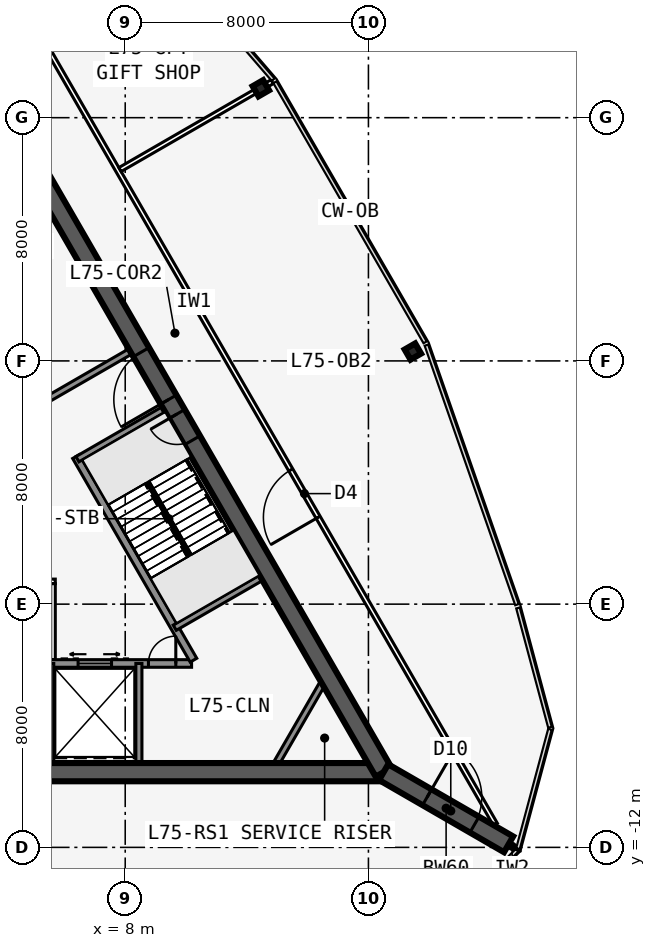
"""IFC4 building model, lengths in metres.
Left out: names, types, materials, properties, quantities, classifications, styles, units other than length and angle.
Written with IfcOpenShell. Run it as: python <this file> out.ifc"""

import sys

from ifc_helpers import new_model, si_unit, direction, frame, frame_2d, origin, origin_2d, place, context, subcontext, project, spatial, rectangle, i_section, extrude, element, fill, save


model = new_model("IFC4")
c1 = context("Model", 3, precision=1e-05, world=origin(), true_north=direction((0.0, 1.0)))
c2 = subcontext(c1, "Body", "Model", "MODEL_VIEW")
j1 = project(units=[si_unit("LENGTHUNIT", "METRE"), si_unit("PLANEANGLEUNIT", "RADIAN")], contexts=[c1])
p1 = place(None, origin())
s1 = spatial("IfcSite", under=j1, at=p1, CompositionType="ELEMENT")
p2 = place(p1, origin())
s2 = spatial("IfcBuilding", under=s1, at=p2, CompositionType="ELEMENT")
p3 = place(p2, frame((0.0, 0.0, 286.8)))
s3 = spatial("IfcBuildingStorey", under=s2, at=p3, CompositionType="ELEMENT", Elevation=286.8)
p4 = place(p3, frame((-16.5, -9.526, 0.0), z_axis=(0.0, 0.0, 1.0), x_axis=(1.0, 0.0, 0.0)))
e1 = element("IfcWall", 1, at=p4, inside=s3, PredefinedType="SHEAR", context=c2, shape_type="SweptSolid", body=[
    extrude(rectangle(XDim=33.0, YDim=0.6, at=frame_2d((16.5, 0.0))), origin(), (0.0, 0.0, 1.0), 6.0),
])
p5 = place(p4, frame((14.05, 0.0, 0.0)))
e2 = element("IfcOpeningElement", 2, at=p5, cuts=e1, PredefinedType="OPENING", context=c2, shape_type="SweptSolid", body=[
    extrude(rectangle(XDim=1.8, YDim=2.13, at=frame_2d((0.9, 1.065))), frame((0.0, 0.31, 0.0), z_axis=(0.0, -1.0, 0.0), x_axis=(1.0, 0.0, 0.0)), (0.0, 0.0, 1.0), 0.62),
])
p6 = place(p3, frame((-0.55, -5.951, 0.0), z_axis=(0.0, 0.0, 1.0), x_axis=(1.0, 0.0, 0.0)))
e3 = element("IfcWall", 3, at=p6, inside=s3, PredefinedType="SOLIDWALL", context=c2, shape_type="SweptSolid", body=[
    extrude(rectangle(XDim=10.733, YDim=0.25, at=frame_2d((5.366, 0.0))), origin(), (0.0, 0.0, 1.0), 5.75),
])
p7 = place(p6, frame((9.314, 0.0, 0.0)))
e4 = element("IfcOpeningElement", 4, at=p7, cuts=e3, PredefinedType="OPENING", context=c2, shape_type="SweptSolid", body=[
    extrude(rectangle(XDim=0.9, YDim=2.13, at=frame_2d((0.45, 1.065))), frame((0.0, 0.135, 0.0), z_axis=(0.0, -1.0, 0.0), x_axis=(1.0, 0.0, 0.0)), (0.0, 0.0, 1.0), 0.27),
])
p8 = place(p6, frame((1.05, 0.0, 0.0)))
e5 = element("IfcOpeningElement", 5, at=p8, cuts=e3, PredefinedType="OPENING", context=c2, shape_type="SweptSolid", body=[
    extrude(rectangle(XDim=1.1, YDim=2.13, at=frame_2d((0.55, 1.065))), frame((0.0, 0.135, 0.0), z_axis=(0.0, -1.0, 0.0), x_axis=(1.0, 0.0, 0.0)), (0.0, 0.0, 1.0), 0.27),
])
p9 = place(p6, frame((4.05, 0.0, 0.0)))
e6 = element("IfcOpeningElement", 6, at=p9, cuts=e3, PredefinedType="OPENING", context=c2, shape_type="SweptSolid", body=[
    extrude(rectangle(XDim=1.1, YDim=2.13, at=frame_2d((0.55, 1.065))), frame((0.0, 0.135, 0.0), z_axis=(0.0, -1.0, 0.0), x_axis=(1.0, 0.0, 0.0)), (0.0, 0.0, 1.0), 0.27),
])
p10 = place(p6, frame((7.0, 0.0, 0.0)))
e7 = element("IfcOpeningElement", 7, at=p10, cuts=e3, PredefinedType="OPENING", context=c2, shape_type="SweptSolid", body=[
    extrude(rectangle(XDim=1.1, YDim=2.13, at=frame_2d((0.55, 1.065))), frame((0.0, 0.135, 0.0), z_axis=(0.0, -1.0, 0.0), x_axis=(1.0, 0.0, 0.0)), (0.0, 0.0, 1.0), 0.27),
])
for number, where, z_axis, x_axis in (
    (8, (5.55, -5.951, 0.0), (0.0, 0.0, 1.0), (0.0, -1.0, 0.0)),
    (9, (8.45, -5.951, 0.0), (0.0, 0.0, 1.0), (0.0, -1.0, 0.0)),
):
    element("IfcWall", number, at=place(p3, frame(where, z_axis=z_axis, x_axis=x_axis)), inside=s3, PredefinedType="SOLIDWALL", context=c2, shape_type="SweptSolid", body=[
        extrude(rectangle(XDim=3.275, YDim=0.2, at=frame_2d((1.637, 0.0))), origin(), (0.0, 0.0, 1.0), 5.75),
    ])
p11 = place(p3, frame((16.5, -9.526, 0.0), z_axis=(0.0, 0.0, 1.0), x_axis=(-0.499999749417, 0.866025548458, 0.0)))
e10 = element("IfcWall", 10, at=p11, inside=s3, PredefinedType="SHEAR", context=c2, shape_type="SweptSolid", body=[
    extrude(rectangle(XDim=33.0, YDim=0.6, at=frame_2d((16.5, 0.0))), origin(), (0.0, 0.0, 1.0), 6.0),
])
p12 = place(p11, frame((14.15, 0.0, 0.0)))
e11 = element("IfcOpeningElement", 11, at=p12, cuts=e10, PredefinedType="OPENING", context=c2, shape_type="SweptSolid", body=[
    extrude(rectangle(XDim=1.8, YDim=2.13, at=frame_2d((0.9, 1.065))), frame((0.0, 0.31, 0.0), z_axis=(0.0, -1.0, 0.0), x_axis=(1.0, 0.0, 0.0)), (0.0, 0.0, 1.0), 0.62),
])
p13 = place(p11, frame((12.6, 0.0, 0.0)))
e12 = element("IfcOpeningElement", 12, at=p13, cuts=e10, PredefinedType="OPENING", context=c2, shape_type="SweptSolid", body=[
    extrude(rectangle(XDim=1.0, YDim=2.13, at=frame_2d((0.5, 1.065))), frame((0.0, 0.31, 0.0), z_axis=(0.0, -1.0, 0.0), x_axis=(1.0, 0.0, 0.0)), (0.0, 0.0, 1.0), 0.62),
])
p14 = place(p3, frame((10.245, -5.843, 0.0), z_axis=(0.0, 0.0, 1.0), x_axis=(-0.499993009313, 0.866029439822, 0.0)))
e13 = element("IfcWall", 13, at=p14, inside=s3, PredefinedType="SOLIDWALL", context=c2, shape_type="SweptSolid", body=[
    extrude(rectangle(XDim=7.733, YDim=0.25, at=frame_2d((3.866, 0.0))), origin(), (0.0, 0.0, 1.0), 5.75),
])
p15 = place(p3, frame((9.629, -4.775, 0.0), z_axis=(0.0, 0.0, 1.0), x_axis=(0.865995643347, 0.500051543047, 0.0)))
e14 = element("IfcWall", 14, at=p15, inside=s3, PredefinedType="SOLIDWALL", context=c2, shape_type="SweptSolid", body=[
    extrude(rectangle(XDim=3.275, YDim=0.2, at=frame_2d((1.638, 0.0))), origin(), (0.0, 0.0, 1.0), 5.75),
])
for number, where, z_axis, x_axis in (
    (15, (6.429, 0.767, 0.0), (0.0, 0.0, 1.0), (0.866, 0.5, 0.0)),
    (16, (5.329, 2.673, 0.0), (0.0, 0.0, 1.0), (0.866, 0.5, 0.0)),
):
    element("IfcWall", number, at=place(p3, frame(where, z_axis=z_axis, x_axis=x_axis)), inside=s3, PredefinedType="SOLIDWALL", context=c2, shape_type="SweptSolid", body=[
        extrude(rectangle(XDim=3.275, YDim=0.2, at=frame_2d((1.637, 0.0))), origin(), (0.0, 0.0, 1.0), 5.75),
    ])
p16 = place(p3, frame((16.5, -9.526, 0.0), z_axis=(0.0, 0.0, 1.0), x_axis=(0.866031398331, -0.499989616998, 0.0)))
e17 = element("IfcWall", 17, at=p16, inside=s3, PredefinedType="SHEAR", context=c2, shape_type="SweptSolid", body=[
    extrude(rectangle(XDim=4.746, YDim=0.6, at=frame_2d((2.373, 0.0))), origin(), (0.0, 0.0, 1.0), 6.0),
])
p17 = place(p16, frame((1.65, 0.0, 0.0)))
e18 = element("IfcOpeningElement", 18, at=p17, cuts=e17, PredefinedType="OPENING", context=c2, shape_type="SweptSolid", body=[
    extrude(rectangle(XDim=1.8, YDim=2.13, at=frame_2d((0.9, 1.065))), frame((0.0, 0.31, 0.0), z_axis=(0.0, -1.0, 0.0), x_axis=(1.0, 0.0, 0.0)), (0.0, 0.0, 1.0), 0.62),
])
for number, where, z_axis, x_axis in (
    (19, (17.461, 4.308, 0.0), (0.0, 0.0, 1.0), (0.866, 0.5, 0.0)),
    (20, (12.461, 12.968, 0.0), (0.0, 0.0, 1.0), (0.866, 0.5, 0.0)),
):
    element("IfcColumn", number, at=place(p3, frame(where, z_axis=z_axis, x_axis=x_axis)), inside=s3, PredefinedType="COLUMN", context=c2, shape_type="SweptSolid", body=[
        extrude(i_section(OverallWidth=0.399, OverallDepth=0.386, WebThickness=0.021, FlangeThickness=0.033, at=origin_2d()), origin(), (0.0, 0.0, 1.0), 6.0),
    ])
p18 = place(p3, frame((20.177, -11.245, 0.0), z_axis=(0.0, 0.0, 1.0), x_axis=(-0.499998875317, 0.866026053119, 0.0)))
e21 = element("IfcWall", 21, at=p18, inside=s3, PredefinedType="PARTITIONING", context=c2, shape_type="SweptSolid", body=[
    extrude(rectangle(XDim=39.654, YDim=0.15, at=frame_2d((19.827, 0.0))), origin(), (0.0, 0.0, 1.0), 5.75),
])
p19 = place(p18, frame((11.664, 0.0, 0.0)))
e22 = element("IfcOpeningElement", 22, at=p19, cuts=e21, PredefinedType="OPENING", context=c2, shape_type="SweptSolid", body=[
    extrude(rectangle(XDim=1.8, YDim=2.13, at=frame_2d((0.9, 1.065))), frame((0.0, 0.085, 0.0), z_axis=(0.0, -1.0, 0.0), x_axis=(1.0, 0.0, 0.0)), (0.0, 0.0, 1.0), 0.17),
])
p20 = place(p18, frame((31.591, 0.0, 0.0)))
e23 = element("IfcOpeningElement", 23, at=p20, cuts=e21, PredefinedType="OPENING", context=c2, shape_type="SweptSolid", body=[
    extrude(rectangle(XDim=1.0, YDim=2.13, at=frame_2d((0.5, 1.065))), frame((0.0, 0.085, 0.0), z_axis=(0.0, -1.0, 0.0), x_axis=(1.0, 0.0, 0.0)), (0.0, 0.0, 1.0), 0.17),
])
p21 = place(p3, frame((7.829, 10.293, 0.0), z_axis=(0.0, 0.0, 1.0), x_axis=(0.866003332883, 0.500038225974, 0.0)))
e24 = element("IfcWall", 24, at=p21, inside=s3, PredefinedType="PARTITIONING", context=c2, shape_type="SweptSolid", body=[
    extrude(rectangle(XDim=5.778, YDim=0.15, at=frame_2d((2.889, 0.0))), origin(), (0.0, 0.0, 1.0), 4.894),
])
p22 = place(p3, frame((20.61, -11.899, 0.0), z_axis=(0.0, 0.0, 1.0), x_axis=(0.866065156741, -0.499931139538, 0.0)))
e25 = element("IfcWall", 25, at=p22, inside=s3, PredefinedType="PARTITIONING", context=c2, shape_type="SweptSolid", body=[
    extrude(rectangle(XDim=0.27, YDim=0.15, at=frame_2d((0.135, 0.0))), origin(), (0.0, 0.0, 1.0), 5.75),
])
p23 = place(p3, frame((-2.65, -3.251, 0.0), z_axis=(0.0, 0.0, 1.0), x_axis=(1.0, 0.0, 0.0)))
e26 = element("IfcWall", 26, at=p23, inside=s3, PredefinedType="PARTITIONING", context=c2, shape_type="SweptSolid", body=[
    extrude(rectangle(XDim=8.35, YDim=0.15, at=frame_2d((4.175, 0.0))), origin(), (0.0, 0.0, 1.0), 5.75),
])
p24 = place(p3, frame((5.625, -5.826, 0.0), z_axis=(0.0, 0.0, 1.0), x_axis=(0.0, 1.0, 0.0)))
e27 = element("IfcWall", 27, at=p24, inside=s3, PredefinedType="PARTITIONING", context=c2, shape_type="SweptSolid", body=[
    extrude(rectangle(XDim=2.5, YDim=0.15, at=frame_2d((1.25, 0.0))), origin(), (0.0, 0.0, 1.0), 5.75),
])
p25 = place(p3, frame((14.479, -6.626, 0.0), z_axis=(0.0, 0.0, 1.0), x_axis=(-0.499952404951, -0.866052881055, 0.0)))
e28 = element("IfcWall", 28, at=p25, inside=s3, PredefinedType="SOLIDWALL", context=c2, shape_type="SweptSolid", body=[
    extrude(rectangle(XDim=3.002, YDim=0.2, at=frame_2d((1.501, 0.0))), origin(), (0.0, 0.0, 1.0), 5.75),
])
p26 = place(p3, frame((10.135, -2.401, 0.0), z_axis=(0.0, 0.0, 1.0), x_axis=(-0.499992232847, 0.866029888106, 0.0)))
e29 = element("IfcWall", 29, at=p26, inside=s3, PredefinedType="SOLIDWALL", context=c2, shape_type="SweptSolid", body=[
    extrude(rectangle(XDim=2.794, YDim=0.1, at=frame_2d((1.397, 0.0))), origin(), (0.0, 0.0, 1.0), 6.0),
])
p27 = place(p19, origin())
e30 = element("IfcDoor", 30, at=p27, inside=s3, OperationType="DOUBLE_DOOR_SINGLE_SWING", PredefinedType="DOOR", context=c2, shape_type="SweptSolid", body=[
    extrude(rectangle(XDim=1.8, YDim=2.13, at=frame_2d((0.9, 1.065))), frame((0.0, 0.025, 0.0), z_axis=(0.0, -1.0, 0.0), x_axis=(1.0, 0.0, 0.0)), (0.0, 0.0, 1.0), 0.05),
])
fill(e22, e30)
p28 = place(p12, origin())
e31 = element("IfcDoor", 31, at=p28, inside=s3, OperationType="DOUBLE_DOOR_SINGLE_SWING", PredefinedType="DOOR", context=c2, shape_type="SweptSolid", body=[
    extrude(rectangle(XDim=1.8, YDim=2.13, at=frame_2d((0.9, 1.065))), frame((0.0, 0.025, 0.0), z_axis=(0.0, -1.0, 0.0), x_axis=(1.0, 0.0, 0.0)), (0.0, 0.0, 1.0), 0.05),
])
fill(e11, e31)
p29 = place(p13, origin())
e32 = element("IfcDoor", 32, at=p29, inside=s3, OperationType="SINGLE_SWING_RIGHT", PredefinedType="DOOR", context=c2, shape_type="SweptSolid", body=[
    extrude(rectangle(XDim=1.0, YDim=2.13, at=frame_2d((0.5, 1.065))), frame((0.0, 0.025, 0.0), z_axis=(0.0, -1.0, 0.0), x_axis=(1.0, 0.0, 0.0)), (0.0, 0.0, 1.0), 0.05),
])
fill(e12, e32)
p30 = place(p17, origin())
e33 = element("IfcDoor", 33, at=p30, inside=s3, OperationType="DOUBLE_DOOR_DOUBLE_SWING", PredefinedType="DOOR", context=c2, shape_type="SweptSolid", body=[
    extrude(rectangle(XDim=1.8, YDim=2.13, at=frame_2d((0.9, 1.065))), frame((0.0, 0.025, 0.0), z_axis=(0.0, -1.0, 0.0), x_axis=(1.0, 0.0, 0.0)), (0.0, 0.0, 1.0), 0.05),
])
fill(e18, e33)
p31 = place(p7, origin())
e34 = element("IfcDoor", 34, at=p31, inside=s3, OperationType="SINGLE_SWING_RIGHT", PredefinedType="DOOR", context=c2, shape_type="SweptSolid", body=[
    extrude(rectangle(XDim=0.9, YDim=2.13, at=frame_2d((0.45, 1.065))), frame((0.0, 0.025, 0.0), z_axis=(0.0, -1.0, 0.0), x_axis=(1.0, 0.0, 0.0)), (0.0, 0.0, 1.0), 0.05),
])
fill(e4, e34)
p32 = place(p10, origin())
e35 = element("IfcDoor", 35, at=p32, inside=s3, OperationType="DOUBLE_DOOR_SLIDING", PredefinedType="USERDEFINED", context=c2, shape_type="SweptSolid", body=[
    extrude(rectangle(XDim=1.1, YDim=2.13, at=frame_2d((0.55, 1.065))), frame((0.0, 0.025, 0.0), z_axis=(0.0, -1.0, 0.0), x_axis=(1.0, 0.0, 0.0)), (0.0, 0.0, 1.0), 0.05),
])
fill(e7, e35)
save(model, sys.argv[1])
